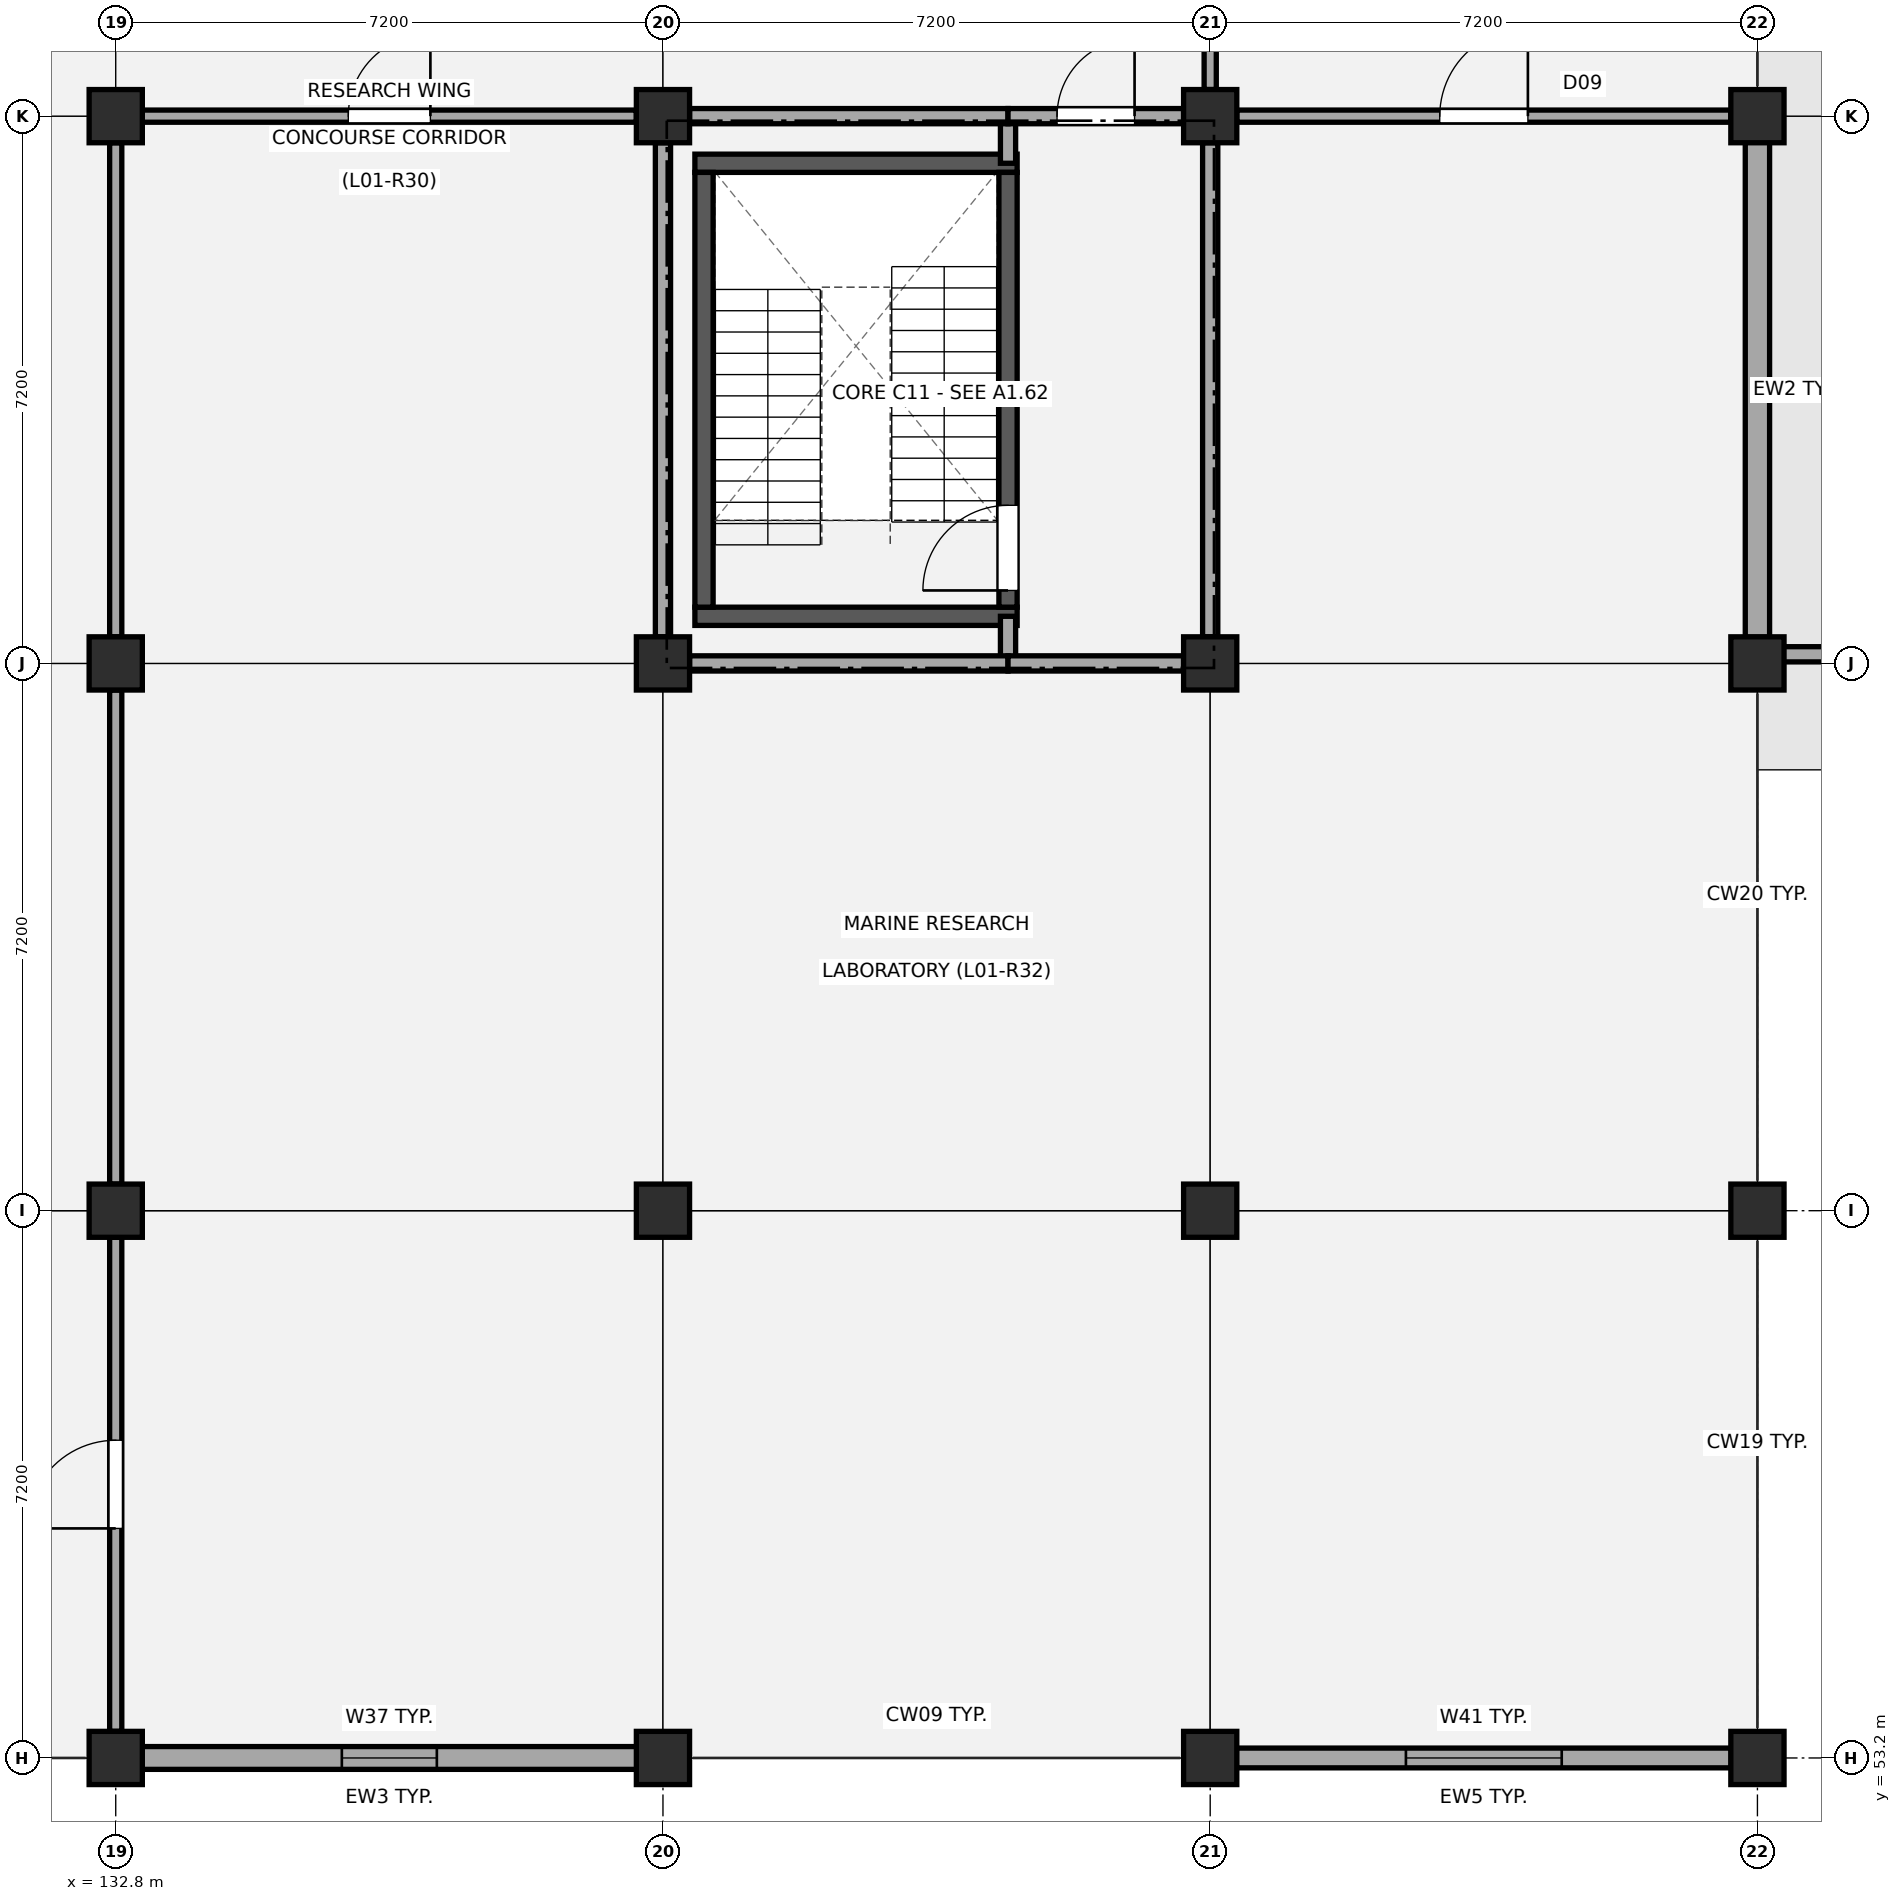
"""IFC4 building model, lengths in metres.
Left out: names, types, materials, properties, quantities, classifications, styles, units other than length and angle.
Written with IfcOpenShell. Run it as: python <this file> out.ifc"""

import sys

from ifc_helpers import new_model, si_unit, direction, frame, frame_2d, origin, origin_2d, place, context, subcontext, project, spatial, rectangle, extrude, element, fill, save


model = new_model("IFC4")
c1 = context("Model", 3, precision=1e-05, world=origin(), true_north=direction((0.0, 1.0)))
c2 = subcontext(c1, "Body", "Model", "MODEL_VIEW")
j1 = project(units=[si_unit("LENGTHUNIT", "METRE"), si_unit("PLANEANGLEUNIT", "RADIAN")], contexts=[c1])
p1 = place(None, origin())
s1 = spatial("IfcSite", under=j1, at=p1, CompositionType="ELEMENT")
p2 = place(p1, origin())
s2 = spatial("IfcBuilding", under=s1, at=p2, CompositionType="ELEMENT")
p3 = place(p2, frame((0.0, 0.0, 4.68)))
s3 = spatial("IfcBuildingStorey", under=s2, at=p3, CompositionType="ELEMENT", Elevation=4.68)
for number, where, z_axis, x_axis in (
    (1, (132.8, 53.2, 0.0), (0.0, 0.0, 1.0), (1.0, 0.0, 0.0)),
    (2, (132.8, 60.4, 0.0), (0.0, 0.0, 1.0), (1.0, 0.0, 0.0)),
    (3, (132.8, 67.6, 0.0), (0.0, 0.0, 1.0), (1.0, 0.0, 0.0)),
    (4, (132.8, 74.8, 0.0), (0.0, 0.0, 1.0), (1.0, 0.0, 0.0)),
    (5, (140.0, 53.2, 0.0), (0.0, 0.0, 1.0), (1.0, 0.0, 0.0)),
    (6, (140.0, 60.4, 0.0), (0.0, 0.0, 1.0), (1.0, 0.0, 0.0)),
    (7, (140.0, 67.6, 0.0), (0.0, 0.0, 1.0), (1.0, 0.0, 0.0)),
    (8, (140.0, 74.8, 0.0), (0.0, 0.0, 1.0), (1.0, 0.0, 0.0)),
    (9, (147.2, 53.2, 0.0), (0.0, 0.0, 1.0), (1.0, 0.0, 0.0)),
    (10, (147.2, 60.4, 0.0), (0.0, 0.0, 1.0), (1.0, 0.0, 0.0)),
    (11, (147.2, 67.6, 0.0), (0.0, 0.0, 1.0), (1.0, 0.0, 0.0)),
    (12, (147.2, 74.8, 0.0), (0.0, 0.0, 1.0), (1.0, 0.0, 0.0)),
    (13, (154.4, 53.2, 0.0), (0.0, 0.0, 1.0), (1.0, 0.0, 0.0)),
    (14, (154.4, 60.4, 0.0), (0.0, 0.0, 1.0), (1.0, 0.0, 0.0)),
    (15, (154.4, 67.6, 0.0), (0.0, 0.0, 1.0), (1.0, 0.0, 0.0)),
    (16, (154.4, 74.8, 0.0), (0.0, 0.0, 1.0), (1.0, 0.0, 0.0)),
):
    element("IfcColumn", number, at=place(p3, frame(where, z_axis=z_axis, x_axis=x_axis)), inside=s3, PredefinedType="COLUMN", context=c2, shape_type="SweptSolid", body=[
        extrude(rectangle(XDim=0.7, YDim=0.7, at=origin_2d()), origin(), (0.0, 0.0, 1.0), 4.5),
    ])
p4 = place(p3, frame((139.655, 53.2, 0.0), z_axis=(0.0, 0.0, 1.0), x_axis=(-1.0, 0.0, 0.0)))
e17 = element("IfcWall", 17, at=p4, inside=s3, PredefinedType="STANDARD", context=c2, shape_type="SweptSolid", body=[
    extrude(rectangle(XDim=6.51, YDim=0.3, at=frame_2d((3.255, 0.0))), origin(), (0.0, 0.0, 1.0), 3.51),
])
p5 = place(p4, frame((2.63, 0.0, 0.95)))
e18 = element("IfcOpeningElement", 18, at=p5, cuts=e17, PredefinedType="OPENING", context=c2, shape_type="SweptSolid", body=[
    extrude(rectangle(XDim=1.25, YDim=1.75, at=frame_2d((0.625, 0.875))), frame((0.0, 0.16, 0.0), z_axis=(0.0, -1.0, 0.0), x_axis=(1.0, 0.0, 0.0)), (0.0, 0.0, 1.0), 0.32),
])
p6 = place(p3, frame((154.055, 53.2, 0.0), z_axis=(0.0, 0.0, 1.0), x_axis=(-1.0, 0.0, 0.0)))
e19 = element("IfcWall", 19, at=p6, inside=s3, PredefinedType="STANDARD", context=c2, shape_type="SweptSolid", body=[
    extrude(rectangle(XDim=6.51, YDim=0.26, at=frame_2d((3.255, 0.0))), origin(), (0.0, 0.0, 1.0), 3.51),
])
p7 = place(p6, frame((2.23, 0.0, 0.95)))
e20 = element("IfcOpeningElement", 20, at=p7, cuts=e19, PredefinedType="OPENING", context=c2, shape_type="SweptSolid", body=[
    extrude(rectangle(XDim=2.05, YDim=1.75, at=frame_2d((1.025, 0.875))), frame((0.0, 0.14, 0.0), z_axis=(0.0, -1.0, 0.0), x_axis=(1.0, 0.0, 0.0)), (0.0, 0.0, 1.0), 0.28),
])
p8 = place(p3, frame((154.4, 74.455, 0.0), z_axis=(0.0, 0.0, 1.0), x_axis=(0.0, -1.0, 0.0)))
e21 = element("IfcWall", 21, at=p8, inside=s3, PredefinedType="STANDARD", context=c2, shape_type="SweptSolid", body=[
    extrude(rectangle(XDim=6.51, YDim=0.32, at=frame_2d((3.255, 0.0))), origin(), (0.0, 0.0, 1.0), 3.51),
])
p9 = place(p3, frame((154.4, 67.72, 0.0), z_axis=(0.0, 0.0, 1.0), x_axis=(1.0, 0.0, 0.0)))
e22 = element("IfcWall", 22, at=p9, inside=s3, PredefinedType="PARAPET", context=c2, shape_type="SweptSolid", body=[
    extrude(rectangle(XDim=7.2, YDim=0.2, at=frame_2d((3.6, 0.0))), origin(), (0.0, 0.0, 1.0), 0.72),
])
for number, where, z_axis, x_axis in (
    (23, (140.42, 68.22, 0.0), (0.0, 0.0, 1.0), (1.0, 0.0, 0.0)),
    (24, (140.42, 74.18, 0.0), (0.0, 0.0, 1.0), (1.0, 0.0, 0.0)),
):
    element("IfcWall", number, at=place(p3, frame(where, z_axis=z_axis, x_axis=x_axis)), inside=s3, PredefinedType="SHEAR", context=c2, shape_type="SweptSolid", body=[
        extrude(rectangle(XDim=4.24, YDim=0.24, at=frame_2d((2.12, 0.0))), origin(), (0.0, 0.0, 1.0), 4.2),
    ])
p10 = place(p3, frame((140.54, 68.34, 0.0), z_axis=(0.0, 0.0, 1.0), x_axis=(0.0, 1.0, 0.0)))
e25 = element("IfcWall", 25, at=p10, inside=s3, PredefinedType="SHEAR", context=c2, shape_type="SweptSolid", body=[
    extrude(rectangle(XDim=5.72, YDim=0.24, at=frame_2d((2.86, 0.0))), origin(), (0.0, 0.0, 1.0), 4.2),
])
p11 = place(p3, frame((144.54, 68.34, 0.0), z_axis=(0.0, 0.0, 1.0), x_axis=(0.0, 1.0, 0.0)))
e26 = element("IfcWall", 26, at=p11, inside=s3, PredefinedType="SHEAR", context=c2, shape_type="SweptSolid", body=[
    extrude(rectangle(XDim=5.72, YDim=0.24, at=frame_2d((2.86, 0.0))), origin(), (0.0, 0.0, 1.0), 4.2),
])
p12 = place(p11, frame((0.22, 0.0, 0.0)))
e27 = element("IfcOpeningElement", 27, at=p12, cuts=e26, PredefinedType="OPENING", context=c2, shape_type="SweptSolid", body=[
    extrude(rectangle(XDim=1.12, YDim=2.15, at=frame_2d((0.56, 1.075))), frame((0.0, 0.13, 0.0), z_axis=(0.0, -1.0, 0.0), x_axis=(1.0, 0.0, 0.0)), (0.0, 0.0, 1.0), 0.26),
])
p13 = place(p3, frame((144.54, 67.6, 0.0), z_axis=(0.0, 0.0, 1.0), x_axis=(0.0, 1.0, 0.0)))
e28 = element("IfcWall", 28, at=p13, inside=s3, PredefinedType="PARTITIONING", context=c2, shape_type="SweptSolid", body=[
    extrude(rectangle(XDim=0.62, YDim=0.2, at=frame_2d((0.31, 0.0))), origin(), (0.0, 0.0, 1.0), 3.54),
])
p14 = place(p3, frame((144.54, 74.18, 0.0), z_axis=(0.0, 0.0, 1.0), x_axis=(0.0, 1.0, 0.0)))
e29 = element("IfcWall", 29, at=p14, inside=s3, PredefinedType="PARTITIONING", context=c2, shape_type="SweptSolid", body=[
    extrude(rectangle(XDim=0.62, YDim=0.2, at=frame_2d((0.31, 0.0))), origin(), (0.0, 0.0, 1.0), 3.59),
])
for number, where, z_axis, x_axis in (
    (30, (140.0, 67.95, 0.0), (0.0, 0.0, 1.0), (0.0, 1.0, 0.0)),
    (31, (147.2, 67.95, 0.0), (0.0, 0.0, 1.0), (0.0, 1.0, 0.0)),
):
    element("IfcWall", number, at=place(p3, frame(where, z_axis=z_axis, x_axis=x_axis)), inside=s3, PredefinedType="PARTITIONING", context=c2, shape_type="SweptSolid", body=[
        extrude(rectangle(XDim=6.5, YDim=0.2, at=frame_2d((3.25, 0.0))), origin(), (0.0, 0.0, 1.0), 3.59),
    ])
p15 = place(p3, frame((140.35, 67.6, 0.0), z_axis=(0.0, 0.0, 1.0), x_axis=(1.0, 0.0, 0.0)))
e32 = element("IfcWall", 32, at=p15, inside=s3, PredefinedType="PARTITIONING", context=c2, shape_type="SweptSolid", body=[
    extrude(rectangle(XDim=4.19, YDim=0.2, at=frame_2d((2.095, 0.0))), origin(), (0.0, 0.0, 1.0), 3.54),
])
p16 = place(p3, frame((144.54, 67.6, 0.0), z_axis=(0.0, 0.0, 1.0), x_axis=(1.0, 0.0, 0.0)))
e33 = element("IfcWall", 33, at=p16, inside=s3, PredefinedType="PARTITIONING", context=c2, shape_type="SweptSolid", body=[
    extrude(rectangle(XDim=2.31, YDim=0.2, at=frame_2d((1.155, 0.0))), origin(), (0.0, 0.0, 1.0), 3.54),
])
p17 = place(p3, frame((140.35, 74.8, 0.0), z_axis=(0.0, 0.0, 1.0), x_axis=(1.0, 0.0, 0.0)))
e34 = element("IfcWall", 34, at=p17, inside=s3, PredefinedType="PARTITIONING", context=c2, shape_type="SweptSolid", body=[
    extrude(rectangle(XDim=4.19, YDim=0.2, at=frame_2d((2.095, 0.0))), origin(), (0.0, 0.0, 1.0), 3.59),
])
p18 = place(p3, frame((144.54, 74.8, 0.0), z_axis=(0.0, 0.0, 1.0), x_axis=(1.0, 0.0, 0.0)))
e35 = element("IfcWall", 35, at=p18, inside=s3, PredefinedType="PARTITIONING", context=c2, shape_type="SweptSolid", body=[
    extrude(rectangle(XDim=2.31, YDim=0.2, at=frame_2d((1.155, 0.0))), origin(), (0.0, 0.0, 1.0), 3.59),
])
p19 = place(p18, frame((0.645, 0.0, 0.0)))
e36 = element("IfcOpeningElement", 36, at=p19, cuts=e35, PredefinedType="OPENING", context=c2, shape_type="SweptSolid", body=[
    extrude(rectangle(XDim=1.02, YDim=2.15, at=frame_2d((0.51, 1.075))), frame((0.0, 0.11, 0.0), z_axis=(0.0, -1.0, 0.0), x_axis=(1.0, 0.0, 0.0)), (0.0, 0.0, 1.0), 0.22),
])
p20 = place(p3, frame((132.8, 53.55, 0.0), z_axis=(0.0, 0.0, 1.0), x_axis=(0.0, 1.0, 0.0)))
e37 = element("IfcWall", 37, at=p20, inside=s3, PredefinedType="PARTITIONING", context=c2, shape_type="SweptSolid", body=[
    extrude(rectangle(XDim=6.5, YDim=0.16, at=frame_2d((3.25, 0.0))), origin(), (0.0, 0.0, 1.0), 3.59),
])
p21 = place(p20, frame((2.67, 0.0, 0.0)))
e38 = element("IfcOpeningElement", 38, at=p21, cuts=e37, PredefinedType="OPENING", context=c2, shape_type="SweptSolid", body=[
    extrude(rectangle(XDim=1.16, YDim=2.18, at=frame_2d((0.58, 1.09))), frame((0.0, 0.09, 0.0), z_axis=(0.0, -1.0, 0.0), x_axis=(1.0, 0.0, 0.0)), (0.0, 0.0, 1.0), 0.18),
])
p22 = place(p3, frame((132.8, 60.75, 0.0), z_axis=(0.0, 0.0, 1.0), x_axis=(0.0, 1.0, 0.0)))
e39 = element("IfcWall", 39, at=p22, inside=s3, PredefinedType="PARTITIONING", context=c2, shape_type="SweptSolid", body=[
    extrude(rectangle(XDim=6.5, YDim=0.16, at=frame_2d((3.25, 0.0))), origin(), (0.0, 0.0, 1.0), 3.54),
])
p23 = place(p3, frame((132.8, 67.95, 0.0), z_axis=(0.0, 0.0, 1.0), x_axis=(0.0, 1.0, 0.0)))
e40 = element("IfcWall", 40, at=p23, inside=s3, PredefinedType="PARTITIONING", context=c2, shape_type="SweptSolid", body=[
    extrude(rectangle(XDim=6.5, YDim=0.16, at=frame_2d((3.25, 0.0))), origin(), (0.0, 0.0, 1.0), 3.59),
])
p24 = place(p3, frame((133.15, 74.8, 0.0), z_axis=(0.0, 0.0, 1.0), x_axis=(1.0, 0.0, 0.0)))
e41 = element("IfcWall", 41, at=p24, inside=s3, PredefinedType="PARTITIONING", context=c2, shape_type="SweptSolid", body=[
    extrude(rectangle(XDim=6.5, YDim=0.16, at=frame_2d((3.25, 0.0))), origin(), (0.0, 0.0, 1.0), 3.54),
])
p25 = place(p24, frame((2.71, 0.0, 0.0)))
e42 = element("IfcOpeningElement", 42, at=p25, cuts=e41, PredefinedType="OPENING", context=c2, shape_type="SweptSolid", body=[
    extrude(rectangle(XDim=1.08, YDim=2.16, at=frame_2d((0.54, 1.08))), frame((0.0, 0.09, 0.0), z_axis=(0.0, -1.0, 0.0), x_axis=(1.0, 0.0, 0.0)), (0.0, 0.0, 1.0), 0.18),
])
p26 = place(p3, frame((147.2, 75.15, 0.0), z_axis=(0.0, 0.0, 1.0), x_axis=(0.0, 1.0, 0.0)))
e43 = element("IfcWall", 43, at=p26, inside=s3, PredefinedType="PARTITIONING", context=c2, shape_type="SweptSolid", body=[
    extrude(rectangle(XDim=6.5, YDim=0.16, at=frame_2d((3.25, 0.0))), origin(), (0.0, 0.0, 1.0), 3.54),
])
p27 = place(p3, frame((147.55, 74.8, 0.0), z_axis=(0.0, 0.0, 1.0), x_axis=(1.0, 0.0, 0.0)))
e44 = element("IfcWall", 44, at=p27, inside=s3, PredefinedType="PARTITIONING", context=c2, shape_type="SweptSolid", body=[
    extrude(rectangle(XDim=6.5, YDim=0.16, at=frame_2d((3.25, 0.0))), origin(), (0.0, 0.0, 1.0), 3.54),
])
p28 = place(p27, frame((2.67, 0.0, 0.0)))
e45 = element("IfcOpeningElement", 45, at=p28, cuts=e44, PredefinedType="OPENING", context=c2, shape_type="SweptSolid", body=[
    extrude(rectangle(XDim=1.16, YDim=2.18, at=frame_2d((0.58, 1.09))), frame((0.0, 0.09, 0.0), z_axis=(0.0, -1.0, 0.0), x_axis=(1.0, 0.0, 0.0)), (0.0, 0.0, 1.0), 0.18),
])
p29 = place(p5, origin())
e46 = element("IfcWindow", 46, at=p29, inside=s3, PartitioningType="SINGLE_PANEL", PredefinedType="WINDOW", context=c2, shape_type="SweptSolid", body=[
    extrude(rectangle(XDim=1.25, YDim=1.75, at=frame_2d((0.625, 0.875))), frame((0.0, 0.03, 0.0), z_axis=(0.0, -1.0, 0.0), x_axis=(1.0, 0.0, 0.0)), (0.0, 0.0, 1.0), 0.06),
])
fill(e18, e46)
p30 = place(p7, origin())
e47 = element("IfcWindow", 47, at=p30, inside=s3, PartitioningType="SINGLE_PANEL", PredefinedType="WINDOW", context=c2, shape_type="SweptSolid", body=[
    extrude(rectangle(XDim=2.05, YDim=1.75, at=frame_2d((1.025, 0.875))), frame((0.0, 0.03, 0.0), z_axis=(0.0, -1.0, 0.0), x_axis=(1.0, 0.0, 0.0)), (0.0, 0.0, 1.0), 0.06),
])
fill(e20, e47)
p31 = place(p12, origin())
e48 = element("IfcDoor", 48, at=p31, inside=s3, OperationType="SINGLE_SWING_LEFT", PredefinedType="DOOR", context=c2, shape_type="SweptSolid", body=[
    extrude(rectangle(XDim=1.12, YDim=2.15, at=frame_2d((0.56, 1.075))), frame((0.0, 0.025, 0.0), z_axis=(0.0, -1.0, 0.0), x_axis=(1.0, 0.0, 0.0)), (0.0, 0.0, 1.0), 0.05),
])
fill(e27, e48)
p32 = place(p19, origin())
e49 = element("IfcDoor", 49, at=p32, inside=s3, OperationType="SINGLE_SWING_RIGHT", PredefinedType="DOOR", context=c2, shape_type="SweptSolid", body=[
    extrude(rectangle(XDim=1.02, YDim=2.15, at=frame_2d((0.51, 1.075))), frame((0.0, 0.025, 0.0), z_axis=(0.0, -1.0, 0.0), x_axis=(1.0, 0.0, 0.0)), (0.0, 0.0, 1.0), 0.05),
])
fill(e36, e49)
p33 = place(p28, origin())
e50 = element("IfcDoor", 50, at=p33, inside=s3, OperationType="SINGLE_SWING_RIGHT", PredefinedType="DOOR", context=c2, shape_type="SweptSolid", body=[
    extrude(rectangle(XDim=1.16, YDim=2.18, at=frame_2d((0.58, 1.09))), frame((0.0, 0.025, 0.0), z_axis=(0.0, -1.0, 0.0), x_axis=(1.0, 0.0, 0.0)), (0.0, 0.0, 1.0), 0.05),
])
fill(e45, e50)
p34 = place(p21, origin())
e51 = element("IfcDoor", 51, at=p34, inside=s3, OperationType="SINGLE_SWING_LEFT", PredefinedType="DOOR", context=c2, shape_type="SweptSolid", body=[
    extrude(rectangle(XDim=1.16, YDim=2.18, at=frame_2d((0.58, 1.09))), frame((0.0, 0.025, 0.0), z_axis=(0.0, -1.0, 0.0), x_axis=(1.0, 0.0, 0.0)), (0.0, 0.0, 1.0), 0.05),
])
fill(e38, e51)
p35 = place(p25, origin())
e52 = element("IfcDoor", 52, at=p35, inside=s3, OperationType="SINGLE_SWING_RIGHT", PredefinedType="DOOR", context=c2, shape_type="SweptSolid", body=[
    extrude(rectangle(XDim=1.08, YDim=2.16, at=frame_2d((0.54, 1.08))), frame((0.0, 0.025, 0.0), z_axis=(0.0, -1.0, 0.0), x_axis=(1.0, 0.0, 0.0)), (0.0, 0.0, 1.0), 0.05),
])
fill(e42, e52)
save(model, sys.argv[1])
